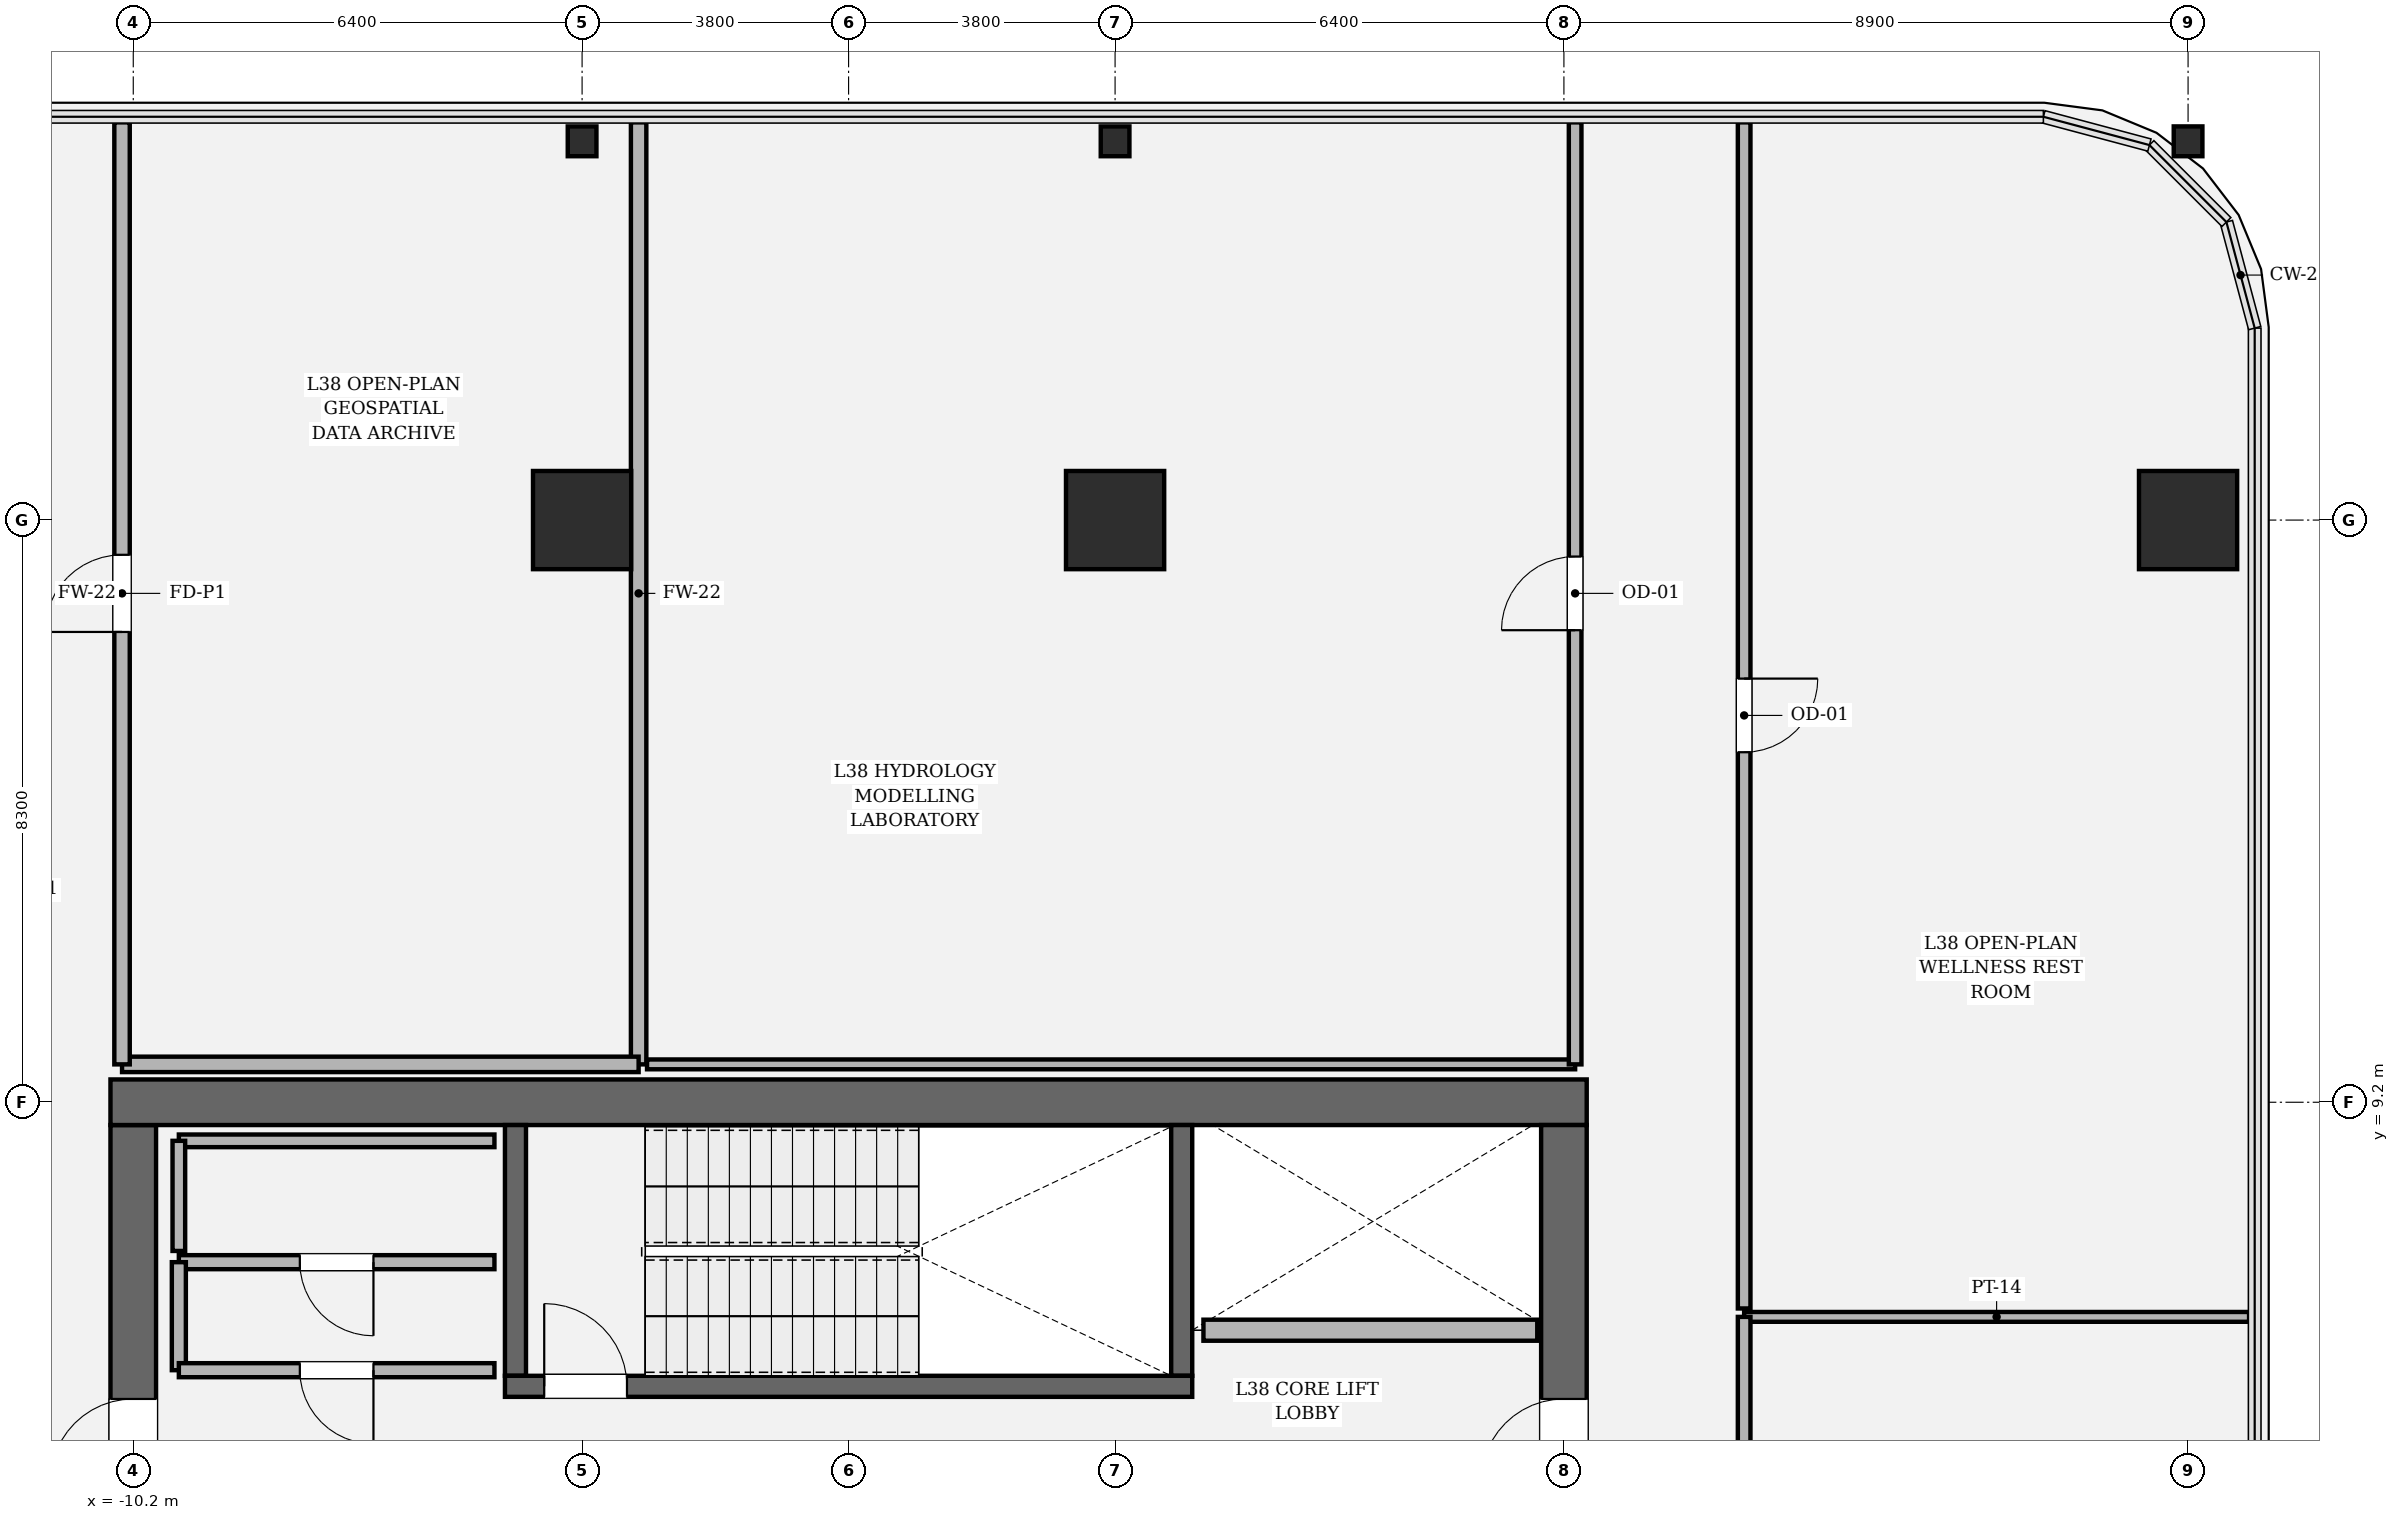
"""IFC4 building model, lengths in metres.
Left out: names, types, materials, properties, quantities, classifications, styles, units other than length and angle.
Written with IfcOpenShell. Run it as: python <this file> out.ifc"""

import sys

from ifc_helpers import new_model, si_unit, direction, frame, frame_2d, origin, origin_2d, place, context, subcontext, project, spatial, rectangle, hollow_rectangle, i_section, extrude, element, fill, save


model = new_model("IFC4")
c1 = context("Model", 3, precision=1e-05, world=origin(), true_north=direction((0.0, 1.0)))
c2 = subcontext(c1, "Body", "Model", "MODEL_VIEW")
j1 = project(units=[si_unit("LENGTHUNIT", "METRE"), si_unit("PLANEANGLEUNIT", "RADIAN")], contexts=[c1])
p1 = place(None, origin())
s1 = spatial("IfcSite", under=j1, at=p1, CompositionType="ELEMENT")
p2 = place(p1, origin())
s2 = spatial("IfcBuilding", under=s1, at=p2, CompositionType="ELEMENT")
p3 = place(p2, frame((0.0, 0.0, 164.1)))
s3 = spatial("IfcBuildingStorey", under=s2, at=p3, CompositionType="ELEMENT", Elevation=164.1)
p4 = place(p3, frame((-10.2, -8.875, 0.0), z_axis=(0.0, 0.0, 1.0), x_axis=(0.0, 1.0, 0.0)))
e1 = element("IfcWall", 1, at=p4, inside=s3, PredefinedType="SHEAR", context=c2, shape_type="SweptSolid", body=[
    extrude(rectangle(XDim=17.75, YDim=0.65, at=frame_2d((8.875, 0.0))), origin(), (0.0, 0.0, 1.0), 4.05),
])
p5 = place(p4, frame((12.665, 0.0, 0.0)))
e2 = element("IfcOpeningElement", 2, at=p5, cuts=e1, PredefinedType="OPENING", context=c2, shape_type="SweptSolid", body=[
    extrude(rectangle(XDim=1.18, YDim=2.2, at=frame_2d((0.59, 1.1))), frame((0.0, 0.335, 0.0), z_axis=(0.0, -1.0, 0.0), x_axis=(1.0, 0.0, 0.0)), (0.0, 0.0, 1.0), 0.67),
])
p6 = place(p3, frame((-10.525, 9.2, 0.0), z_axis=(0.0, 0.0, 1.0), x_axis=(1.0, 0.0, 0.0)))
e3 = element("IfcWall", 3, at=p6, inside=s3, PredefinedType="SHEAR", context=c2, shape_type="SweptSolid", body=[
    extrude(rectangle(XDim=21.05, YDim=0.65, at=frame_2d((10.525, 0.0))), origin(), (0.0, 0.0, 1.0), 4.05),
])
p7 = place(p3, frame((10.2, 8.875, 0.0), z_axis=(0.0, 0.0, 1.0), x_axis=(0.0, -1.0, 0.0)))
e4 = element("IfcWall", 4, at=p7, inside=s3, PredefinedType="SHEAR", context=c2, shape_type="SweptSolid", body=[
    extrude(rectangle(XDim=17.75, YDim=0.65, at=frame_2d((8.875, 0.0))), origin(), (0.0, 0.0, 1.0), 4.05),
])
p8 = place(p7, frame((3.905, 0.0, 0.0)))
e5 = element("IfcOpeningElement", 5, at=p8, cuts=e4, PredefinedType="OPENING", context=c2, shape_type="SweptSolid", body=[
    extrude(rectangle(XDim=1.18, YDim=2.2, at=frame_2d((0.59, 1.1))), frame((0.0, 0.335, 0.0), z_axis=(0.0, -1.0, 0.0), x_axis=(1.0, 0.0, 0.0)), (0.0, 0.0, 1.0), 0.67),
])
for number, where, z_axis, x_axis in (
    (6, (-4.75, 5.3, 0.0), (0.0, 0.0, 1.0), (0.0, 1.0, 0.0)),
    (7, (4.75, 8.875, 0.0), (0.0, 0.0, 1.0), (0.0, -1.0, 0.0)),
):
    element("IfcWall", number, at=place(p3, frame(where, z_axis=z_axis, x_axis=x_axis)), inside=s3, PredefinedType="SOLIDWALL", context=c2, shape_type="SweptSolid", body=[
        extrude(rectangle(XDim=3.575, YDim=0.3, at=frame_2d((1.788, 0.0))), origin(), (0.0, 0.0, 1.0), 4.05),
    ])
p9 = place(p3, frame((-4.9, 5.15, 0.0), z_axis=(0.0, 0.0, 1.0), x_axis=(1.0, 0.0, 0.0)))
e8 = element("IfcWall", 8, at=p9, inside=s3, PredefinedType="SOLIDWALL", context=c2, shape_type="SweptSolid", body=[
    extrude(rectangle(XDim=9.8, YDim=0.3, at=frame_2d((4.9, 0.0))), origin(), (0.0, 0.0, 1.0), 4.05),
])
p10 = place(p9, frame((0.56, 0.0, 0.0)))
e9 = element("IfcOpeningElement", 9, at=p10, cuts=e8, PredefinedType="OPENING", context=c2, shape_type="SweptSolid", body=[
    extrude(rectangle(XDim=1.18, YDim=2.2, at=frame_2d((0.59, 1.1))), frame((0.0, 0.16, 0.0), z_axis=(0.0, -1.0, 0.0), x_axis=(1.0, 0.0, 0.0)), (0.0, 0.0, 1.0), 0.32),
])
for number, where, z_axis, x_axis in (
    (10, (19.1, 17.5, 0.0), (0.0, 0.0, 1.0), (1.0, 0.0, 0.0)),
    (11, (3.8, 17.5, 0.0), (0.0, 0.0, 1.0), (1.0, 0.0, 0.0)),
    (12, (-3.8, 17.5, 0.0), (0.0, 0.0, 1.0), (1.0, 0.0, 0.0)),
):
    element("IfcColumn", number, at=place(p3, frame(where, z_axis=z_axis, x_axis=x_axis)), inside=s3, PredefinedType="COLUMN", context=c2, shape_type="SweptSolid", body=[
        extrude(hollow_rectangle(XDim=1.4, YDim=1.4, WallThickness=0.042, at=origin_2d()), origin(), (0.0, 0.0, 1.0), 4.05),
    ])
for number, where, z_axis, x_axis in (
    (13, (-3.8, 22.9, 0.0), (0.0, 0.0, 1.0), (1.0, 0.0, 0.0)),
    (14, (3.8, 22.9, 0.0), (0.0, 0.0, 1.0), (1.0, 0.0, 0.0)),
    (15, (19.1, 22.9, 0.0), (0.0, 0.0, 1.0), (1.0, 0.0, 0.0)),
):
    element("IfcColumn", number, at=place(p3, frame(where, z_axis=z_axis, x_axis=x_axis)), inside=s3, PredefinedType="COLUMN", context=c2, shape_type="SweptSolid", body=[
        extrude(i_section(OverallWidth=0.409, OverallDepth=0.425, WebThickness=0.032, FlangeThickness=0.052, FilletRadius=0.018, at=origin_2d()), origin(), (0.0, 0.0, 1.0), 4.048),
    ])
p11 = place(p3, frame((5.06, 5.95, 0.0), z_axis=(0.0, 0.0, 1.0), x_axis=(1.0, 0.0, 0.0)))
e16 = element("IfcWall", 16, at=p11, inside=s3, PredefinedType="SOLIDWALL", context=c2, shape_type="SweptSolid", body=[
    extrude(rectangle(XDim=4.76, YDim=0.3, at=frame_2d((2.38, 0.0))), origin(), (0.0, 0.0, 1.0), 3.83),
])
p12 = place(p3, frame((-5.05, 6.92, 0.0), z_axis=(0.0, 0.0, 1.0), x_axis=(-1.0, 0.0, 0.0)))
e17 = element("IfcWall", 17, at=p12, inside=s3, PredefinedType="SOLIDWALL", context=c2, shape_type="SweptSolid", body=[
    extrude(rectangle(XDim=4.5, YDim=0.2, at=frame_2d((2.25, 0.0))), origin(), (0.0, 0.0, 1.0), 3.83),
])
p13 = place(p12, frame((1.725, 0.0, 0.0)))
e18 = element("IfcOpeningElement", 18, at=p13, cuts=e17, PredefinedType="OPENING", context=c2, shape_type="SweptSolid", body=[
    extrude(rectangle(XDim=1.05, YDim=2.2, at=frame_2d((0.525, 1.1))), frame((0.0, 0.11, 0.0), z_axis=(0.0, -1.0, 0.0), x_axis=(1.0, 0.0, 0.0)), (0.0, 0.0, 1.0), 0.22),
])
p14 = place(p3, frame((-9.55, 6.92, 0.0), z_axis=(0.0, 0.0, 1.0), x_axis=(0.0, -1.0, 0.0)))
e19 = element("IfcWall", 19, at=p14, inside=s3, PredefinedType="SOLIDWALL", context=c2, shape_type="SweptSolid", body=[
    extrude(rectangle(XDim=1.54, YDim=0.2, at=frame_2d((0.77, 0.0))), origin(), (0.0, 0.0, 1.0), 3.83),
])
p15 = place(p3, frame((-9.55, 5.38, 0.0), z_axis=(0.0, 0.0, 1.0), x_axis=(1.0, 0.0, 0.0)))
e20 = element("IfcWall", 20, at=p15, inside=s3, PredefinedType="SOLIDWALL", context=c2, shape_type="SweptSolid", body=[
    extrude(rectangle(XDim=4.5, YDim=0.2, at=frame_2d((2.25, 0.0))), origin(), (0.0, 0.0, 1.0), 3.83),
])
p16 = place(p15, frame((1.725, 0.0, 0.0)))
e21 = element("IfcOpeningElement", 21, at=p16, cuts=e20, PredefinedType="OPENING", context=c2, shape_type="SweptSolid", body=[
    extrude(rectangle(XDim=1.05, YDim=2.2, at=frame_2d((0.525, 1.1))), frame((0.0, 0.11, 0.0), z_axis=(0.0, -1.0, 0.0), x_axis=(1.0, 0.0, 0.0)), (0.0, 0.0, 1.0), 0.22),
])
p17 = place(p3, frame((-5.05, 8.65, 0.0), z_axis=(0.0, 0.0, 1.0), x_axis=(-1.0, 0.0, 0.0)))
e22 = element("IfcWall", 22, at=p17, inside=s3, PredefinedType="PARTITIONING", context=c2, shape_type="SweptSolid", body=[
    extrude(rectangle(XDim=4.5, YDim=0.18, at=frame_2d((2.25, 0.0))), origin(), (0.0, 0.0, 1.0), 3.83),
])
p18 = place(p3, frame((-9.55, 8.65, 0.0), z_axis=(0.0, 0.0, 1.0), x_axis=(0.0, -1.0, 0.0)))
e23 = element("IfcWall", 23, at=p18, inside=s3, PredefinedType="PARTITIONING", context=c2, shape_type="SweptSolid", body=[
    extrude(rectangle(XDim=1.57, YDim=0.18, at=frame_2d((0.785, 0.0))), origin(), (0.0, 0.0, 1.0), 3.83),
])
p19 = place(p3, frame((12.77, 6.14, 0.0), z_axis=(0.0, 0.0, 1.0), x_axis=(1.0, 0.0, 0.0)))
e24 = element("IfcWall", 24, at=p19, inside=s3, PredefinedType="PARTITIONING", context=c2, shape_type="SweptSolid", body=[
    extrude(rectangle(XDim=7.2, YDim=0.14, at=frame_2d((3.6, 0.0))), origin(), (0.0, 0.0, 1.0), 3.174),
])
p20 = place(p3, frame((12.77, -11.49, 0.0), z_axis=(0.0, 0.0, 1.0), x_axis=(0.0, 1.0, 0.0)))
e25 = element("IfcWall", 25, at=p20, inside=s3, PredefinedType="PARTITIONING", context=c2, shape_type="SweptSolid", body=[
    extrude(rectangle(XDim=17.63, YDim=0.18, at=frame_2d((8.815, 0.0))), origin(), (0.0, 0.0, 1.0), 3.174),
])
p21 = place(p20, frame((8.115, 0.0, 0.0)))
e26 = element("IfcOpeningElement", 26, at=p21, cuts=e25, PredefinedType="OPENING", context=c2, shape_type="SweptSolid", body=[
    extrude(rectangle(XDim=1.4, YDim=2.25, at=frame_2d((0.7, 1.125))), frame((0.0, 0.1, 0.0), z_axis=(0.0, -1.0, 0.0), x_axis=(1.0, 0.0, 0.0)), (0.0, 0.0, 1.0), 0.2),
])
p22 = place(p3, frame((12.77, 6.26, 0.0), z_axis=(0.0, 0.0, 1.0), x_axis=(0.0, 1.0, 0.0)))
e27 = element("IfcWall", 27, at=p22, inside=s3, PredefinedType="PARTITIONING", context=c2, shape_type="SweptSolid", body=[
    extrude(rectangle(XDim=16.91, YDim=0.18, at=frame_2d((8.455, 0.0))), origin(), (0.0, 0.0, 1.0), 2.544),
])
p23 = place(p22, frame((7.93, 0.0, 0.0)))
e28 = element("IfcOpeningElement", 28, at=p23, cuts=e27, PredefinedType="OPENING", context=c2, shape_type="SweptSolid", body=[
    extrude(rectangle(XDim=1.05, YDim=2.2, at=frame_2d((0.525, 1.1))), frame((0.0, 0.1, 0.0), z_axis=(0.0, -1.0, 0.0), x_axis=(1.0, 0.0, 0.0)), (0.0, 0.0, 1.0), 0.2),
])
p24 = place(p3, frame((-2.994, 23.17, 0.0), z_axis=(0.0, 0.0, 1.0), x_axis=(0.0, -1.0, 0.0)))
e29 = element("IfcWall", 29, at=p24, inside=s3, PredefinedType="SOLIDWALL", context=c2, shape_type="SweptSolid", body=[
    extrude(rectangle(XDim=13.43, YDim=0.22, at=frame_2d((6.715, 0.0))), origin(), (0.0, 0.0, 1.0), 2.544),
])
p25 = place(p3, frame((-2.994, 9.74, 0.0), z_axis=(0.0, 0.0, 1.0), x_axis=(-1.0, 0.0, 0.0)))
e30 = element("IfcWall", 30, at=p25, inside=s3, PredefinedType="SOLIDWALL", context=c2, shape_type="SweptSolid", body=[
    extrude(rectangle(XDim=7.366, YDim=0.22, at=frame_2d((3.683, 0.0))), origin(), (0.0, 0.0, 1.0), 3.174),
])
p26 = place(p3, frame((-10.36, 9.74, 0.0), z_axis=(0.0, 0.0, 1.0), x_axis=(0.0, 1.0, 0.0)))
e31 = element("IfcWall", 31, at=p26, inside=s3, PredefinedType="SOLIDWALL", context=c2, shape_type="SweptSolid", body=[
    extrude(rectangle(XDim=13.43, YDim=0.22, at=frame_2d((6.715, 0.0))), origin(), (0.0, 0.0, 1.0), 2.544),
])
p27 = place(p26, frame((6.165, 0.0, 0.0)))
e32 = element("IfcOpeningElement", 32, at=p27, cuts=e31, PredefinedType="OPENING", context=c2, shape_type="SweptSolid", body=[
    extrude(rectangle(XDim=1.1, YDim=2.2, at=frame_2d((0.55, 1.1))), frame((0.0, 0.12, 0.0), z_axis=(0.0, -1.0, 0.0), x_axis=(1.0, 0.0, 0.0)), (0.0, 0.0, 1.0), 0.24),
])
p28 = place(p3, frame((10.36, 9.74, 0.0), z_axis=(0.0, 0.0, 1.0), x_axis=(-1.0, 0.0, 0.0)))
e33 = element("IfcWall", 33, at=p28, inside=s3, PredefinedType="PARTITIONING", context=c2, shape_type="SweptSolid", body=[
    extrude(rectangle(XDim=13.234, YDim=0.14, at=frame_2d((6.617, 0.0))), origin(), (0.0, 0.0, 1.0), 3.174),
])
p29 = place(p3, frame((10.36, 23.17, 0.0), z_axis=(0.0, 0.0, 1.0), x_axis=(0.0, -1.0, 0.0)))
e34 = element("IfcWall", 34, at=p29, inside=s3, PredefinedType="PARTITIONING", context=c2, shape_type="SweptSolid", body=[
    extrude(rectangle(XDim=13.43, YDim=0.18, at=frame_2d((6.715, 0.0))), origin(), (0.0, 0.0, 1.0), 2.544),
])
p30 = place(p29, frame((6.19, 0.0, 0.0)))
e35 = element("IfcOpeningElement", 35, at=p30, cuts=e34, PredefinedType="OPENING", context=c2, shape_type="SweptSolid", body=[
    extrude(rectangle(XDim=1.05, YDim=2.2, at=frame_2d((0.525, 1.1))), frame((0.0, 0.1, 0.0), z_axis=(0.0, -1.0, 0.0), x_axis=(1.0, 0.0, 0.0)), (0.0, 0.0, 1.0), 0.2),
])
p31 = place(p10, origin())
e36 = element("IfcDoor", 36, at=p31, inside=s3, OperationType="SINGLE_SWING_LEFT", PredefinedType="DOOR", context=c2, shape_type="SweptSolid", body=[
    extrude(rectangle(XDim=1.18, YDim=2.2, at=frame_2d((0.59, 1.1))), frame((0.0, 0.025, 0.0), z_axis=(0.0, -1.0, 0.0), x_axis=(1.0, 0.0, 0.0)), (0.0, 0.0, 1.0), 0.05),
])
fill(e9, e36)
p32 = place(p5, origin())
e37 = element("IfcDoor", 37, at=p32, inside=s3, OperationType="SINGLE_SWING_LEFT", PredefinedType="DOOR", context=c2, shape_type="SweptSolid", body=[
    extrude(rectangle(XDim=1.18, YDim=2.2, at=frame_2d((0.59, 1.1))), frame((0.0, 0.025, 0.0), z_axis=(0.0, -1.0, 0.0), x_axis=(1.0, 0.0, 0.0)), (0.0, 0.0, 1.0), 0.05),
])
fill(e2, e37)
p33 = place(p8, origin())
e38 = element("IfcDoor", 38, at=p33, inside=s3, OperationType="SINGLE_SWING_RIGHT", PredefinedType="DOOR", context=c2, shape_type="SweptSolid", body=[
    extrude(rectangle(XDim=1.18, YDim=2.2, at=frame_2d((0.59, 1.1))), frame((0.0, 0.025, 0.0), z_axis=(0.0, -1.0, 0.0), x_axis=(1.0, 0.0, 0.0)), (0.0, 0.0, 1.0), 0.05),
])
fill(e5, e38)
p34 = place(p16, origin())
e39 = element("IfcDoor", 39, at=p34, inside=s3, OperationType="SINGLE_SWING_RIGHT", PredefinedType="DOOR", context=c2, shape_type="SweptSolid", body=[
    extrude(rectangle(XDim=1.05, YDim=2.2, at=frame_2d((0.525, 1.1))), frame((0.0, 0.025, 0.0), z_axis=(0.0, -1.0, 0.0), x_axis=(1.0, 0.0, 0.0)), (0.0, 0.0, 1.0), 0.05),
])
fill(e21, e39)
p35 = place(p13, origin())
e40 = element("IfcDoor", 40, at=p35, inside=s3, OperationType="SINGLE_SWING_LEFT", PredefinedType="DOOR", context=c2, shape_type="SweptSolid", body=[
    extrude(rectangle(XDim=1.05, YDim=2.2, at=frame_2d((0.525, 1.1))), frame((0.0, 0.025, 0.0), z_axis=(0.0, -1.0, 0.0), x_axis=(1.0, 0.0, 0.0)), (0.0, 0.0, 1.0), 0.05),
])
fill(e18, e40)
p36 = place(p23, origin())
e41 = element("IfcDoor", 41, at=p36, inside=s3, OperationType="SINGLE_SWING_RIGHT", PredefinedType="DOOR", context=c2, shape_type="SweptSolid", body=[
    extrude(rectangle(XDim=1.05, YDim=2.2, at=frame_2d((0.525, 1.1))), frame((0.0, 0.025, 0.0), z_axis=(0.0, -1.0, 0.0), x_axis=(1.0, 0.0, 0.0)), (0.0, 0.0, 1.0), 0.05),
])
fill(e28, e41)
p37 = place(p27, origin())
e42 = element("IfcDoor", 42, at=p37, inside=s3, OperationType="SINGLE_SWING_LEFT", PredefinedType="DOOR", context=c2, shape_type="SweptSolid", body=[
    extrude(rectangle(XDim=1.1, YDim=2.2, at=frame_2d((0.55, 1.1))), frame((0.0, 0.025, 0.0), z_axis=(0.0, -1.0, 0.0), x_axis=(1.0, 0.0, 0.0)), (0.0, 0.0, 1.0), 0.05),
])
fill(e32, e42)
p38 = place(p30, origin())
e43 = element("IfcDoor", 43, at=p38, inside=s3, OperationType="SINGLE_SWING_RIGHT", PredefinedType="DOOR", context=c2, shape_type="SweptSolid", body=[
    extrude(rectangle(XDim=1.05, YDim=2.2, at=frame_2d((0.525, 1.1))), frame((0.0, 0.025, 0.0), z_axis=(0.0, -1.0, 0.0), x_axis=(1.0, 0.0, 0.0)), (0.0, 0.0, 1.0), 0.05),
])
fill(e35, e43)
save(model, sys.argv[1])
